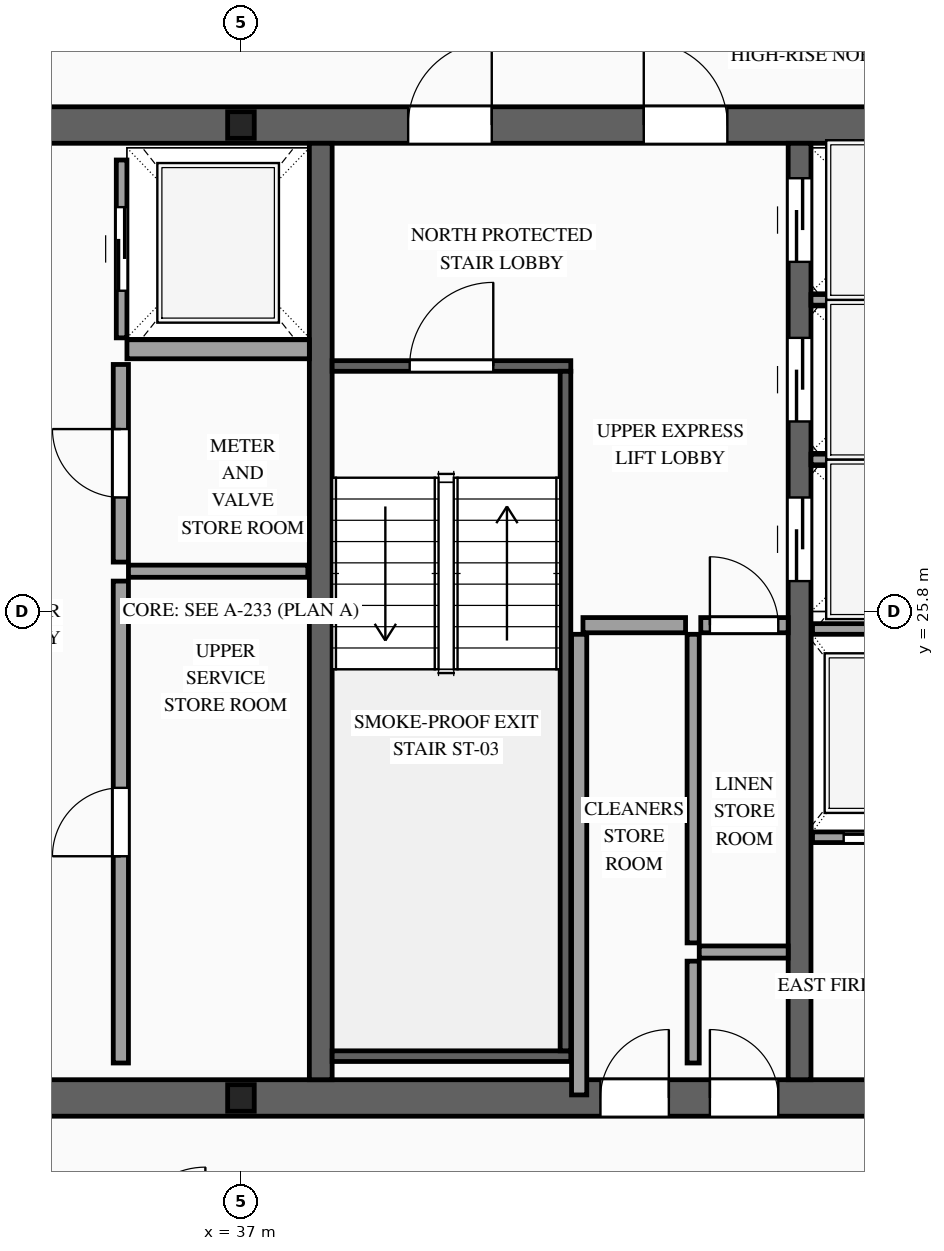
"""IFC4 building model, lengths in metres.
Left out: names, types, materials, properties, quantities, classifications, styles, units other than length and angle.
Written with IfcOpenShell. Run it as: python <this file> out.ifc"""

import sys

from ifc_helpers import new_model, si_unit, direction, frame, frame_2d, origin, origin_2d, place, context, subcontext, project, spatial, rectangle, i_section, extrude, source, transform, mapped, element, fill, save


model = new_model("IFC4")
c1 = context("Model", 3, precision=1e-05, world=origin(), true_north=direction((0.0, 1.0)))
c2 = subcontext(c1, "Body", "Model", "MODEL_VIEW")
j1 = project(units=[si_unit("LENGTHUNIT", "METRE"), si_unit("PLANEANGLEUNIT", "RADIAN")], contexts=[c1])
p1 = place(None, origin())
s1 = spatial("IfcSite", under=j1, at=p1, CompositionType="ELEMENT")
p2 = place(p1, origin())
s2 = spatial("IfcBuilding", under=s1, at=p2, CompositionType="ELEMENT")
p3 = place(p2, frame((0.0, 0.0, 314.7)))
s3 = spatial("IfcBuildingStorey", under=s2, at=p3, CompositionType="ELEMENT", Elevation=314.7)
p4 = place(p3, frame((23.56, 19.4, 0.0), z_axis=(0.0, 0.0, 1.0), x_axis=(1.0, 0.0, 0.0)))
e1 = element("IfcWall", 1, at=p4, inside=s3, PredefinedType="SHEAR", context=c2, shape_type="SweptSolid", body=[
    extrude(rectangle(XDim=26.88, YDim=0.48, at=frame_2d((13.44, 0.0))), origin(), (0.0, 0.0, 1.0), 3.5),
])
p5 = place(p4, frame((1.89, 0.0, 0.0)))
e2 = element("IfcOpeningElement", 2, at=p5, cuts=e1, PredefinedType="OPENING", context=c2, shape_type="SweptSolid", body=[
    extrude(rectangle(XDim=1.1, YDim=2.2, at=frame_2d((0.55, 1.1))), frame((0.0, 0.255, 0.0), z_axis=(0.0, -1.0, 0.0), x_axis=(1.0, 0.0, 0.0)), (0.0, 0.0, 1.0), 0.51),
])
p6 = place(p4, frame((9.79, 0.0, 0.0)))
e3 = element("IfcOpeningElement", 3, at=p6, cuts=e1, PredefinedType="OPENING", context=c2, shape_type="SweptSolid", body=[
    extrude(rectangle(XDim=1.1, YDim=2.2, at=frame_2d((0.55, 1.1))), frame((0.0, 0.255, 0.0), z_axis=(0.0, -1.0, 0.0), x_axis=(1.0, 0.0, 0.0)), (0.0, 0.0, 1.0), 0.51),
])
p7 = place(p4, frame((22.99, 0.0, 0.0)))
e4 = element("IfcOpeningElement", 4, at=p7, cuts=e1, PredefinedType="OPENING", context=c2, shape_type="SweptSolid", body=[
    extrude(rectangle(XDim=1.1, YDim=2.2, at=frame_2d((0.55, 1.1))), frame((0.0, 0.255, 0.0), z_axis=(0.0, -1.0, 0.0), x_axis=(1.0, 0.0, 0.0)), (0.0, 0.0, 1.0), 0.51),
])
p8 = place(p4, frame((19.61, 0.0, 0.0)))
e5 = element("IfcOpeningElement", 5, at=p8, cuts=e1, PredefinedType="OPENING", context=c2, shape_type="SweptSolid", body=[
    extrude(rectangle(XDim=0.9, YDim=2.15, at=frame_2d((0.45, 1.075))), frame((0.0, 0.255, 0.0), z_axis=(0.0, -1.0, 0.0), x_axis=(1.0, 0.0, 0.0)), (0.0, 0.0, 1.0), 0.51),
])
p9 = place(p4, frame((18.17, 0.0, 0.0)))
e6 = element("IfcOpeningElement", 6, at=p9, cuts=e1, PredefinedType="OPENING", context=c2, shape_type="SweptSolid", body=[
    extrude(rectangle(XDim=0.9, YDim=2.15, at=frame_2d((0.45, 1.075))), frame((0.0, 0.255, 0.0), z_axis=(0.0, -1.0, 0.0), x_axis=(1.0, 0.0, 0.0)), (0.0, 0.0, 1.0), 0.51),
])
p10 = place(p3, frame((23.56, 32.2, 0.0), z_axis=(0.0, 0.0, 1.0), x_axis=(1.0, 0.0, 0.0)))
e7 = element("IfcWall", 7, at=p10, inside=s3, PredefinedType="SHEAR", context=c2, shape_type="SweptSolid", body=[
    extrude(rectangle(XDim=26.88, YDim=0.48, at=frame_2d((13.44, 0.0))), origin(), (0.0, 0.0, 1.0), 3.5),
])
p11 = place(p10, frame((4.51, 0.0, 0.0)))
e8 = element("IfcOpeningElement", 8, at=p11, cuts=e7, PredefinedType="OPENING", context=c2, shape_type="SweptSolid", body=[
    extrude(rectangle(XDim=0.9, YDim=2.15, at=frame_2d((0.45, 1.075))), frame((0.0, 0.255, 0.0), z_axis=(0.0, -1.0, 0.0), x_axis=(1.0, 0.0, 0.0)), (0.0, 0.0, 1.0), 0.51),
])
p12 = place(p10, frame((9.79, 0.0, 0.0)))
e9 = element("IfcOpeningElement", 9, at=p12, cuts=e7, PredefinedType="OPENING", context=c2, shape_type="SweptSolid", body=[
    extrude(rectangle(XDim=1.1, YDim=2.2, at=frame_2d((0.55, 1.1))), frame((0.0, 0.255, 0.0), z_axis=(0.0, -1.0, 0.0), x_axis=(1.0, 0.0, 0.0)), (0.0, 0.0, 1.0), 0.51),
])
p13 = place(p10, frame((15.64, 0.0, 0.0)))
e10 = element("IfcOpeningElement", 10, at=p13, cuts=e7, PredefinedType="OPENING", context=c2, shape_type="SweptSolid", body=[
    extrude(rectangle(XDim=1.1, YDim=2.2, at=frame_2d((0.55, 1.1))), frame((0.0, 0.255, 0.0), z_axis=(0.0, -1.0, 0.0), x_axis=(1.0, 0.0, 0.0)), (0.0, 0.0, 1.0), 0.51),
])
p14 = place(p10, frame((18.74, 0.0, 0.0)))
e11 = element("IfcOpeningElement", 11, at=p14, cuts=e7, PredefinedType="OPENING", context=c2, shape_type="SweptSolid", body=[
    extrude(rectangle(XDim=1.1, YDim=2.2, at=frame_2d((0.55, 1.1))), frame((0.0, 0.255, 0.0), z_axis=(0.0, -1.0, 0.0), x_axis=(1.0, 0.0, 0.0)), (0.0, 0.0, 1.0), 0.51),
])
m1 = source(origin(), c2, "Body", "SweptSolid", [
    extrude(rectangle(XDim=12.32, YDim=0.3, at=frame_2d((6.16, 0.0))), origin(), (0.0, 0.0, 1.0), 3.5),
])
p15 = place(p3, frame((38.05, 19.64, 0.0), z_axis=(0.0, 0.0, 1.0), x_axis=(0.0, 1.0, 0.0)))
e12 = element("IfcWall", 12, at=p15, inside=s3, PredefinedType="SOLIDWALL", context=c2, shape_type="MappedRepresentation", body=[
    mapped(m1, transform((0.0, 0.0, 0.0), scale=1.0)),
])
p16 = place(p3, frame((44.35, 19.64, 0.0), z_axis=(0.0, 0.0, 1.0), x_axis=(0.0, 1.0, 0.0)))
e13 = element("IfcWall", 13, at=p16, inside=s3, PredefinedType="SOLIDWALL", context=c2, shape_type="SweptSolid", body=[
    extrude(rectangle(XDim=12.32, YDim=0.3, at=frame_2d((6.16, 0.0))), origin(), (0.0, 0.0, 1.0), 3.5),
])
p17 = place(p16, frame((6.56, 0.0, 0.0)))
e14 = element("IfcOpeningElement", 14, at=p17, cuts=e13, PredefinedType="OPENING", context=c2, shape_type="SweptSolid", body=[
    extrude(rectangle(XDim=1.1, YDim=2.2, at=frame_2d((0.55, 1.1))), frame((0.0, 0.165, 0.0), z_axis=(0.0, -1.0, 0.0), x_axis=(1.0, 0.0, 0.0)), (0.0, 0.0, 1.0), 0.33),
])
p18 = place(p16, frame((8.66, 0.0, 0.0)))
e15 = element("IfcOpeningElement", 15, at=p18, cuts=e13, PredefinedType="OPENING", context=c2, shape_type="SweptSolid", body=[
    extrude(rectangle(XDim=1.1, YDim=2.2, at=frame_2d((0.55, 1.1))), frame((0.0, 0.165, 0.0), z_axis=(0.0, -1.0, 0.0), x_axis=(1.0, 0.0, 0.0)), (0.0, 0.0, 1.0), 0.33),
])
p19 = place(p16, frame((10.76, 0.0, 0.0)))
e16 = element("IfcOpeningElement", 16, at=p19, cuts=e13, PredefinedType="OPENING", context=c2, shape_type="SweptSolid", body=[
    extrude(rectangle(XDim=1.1, YDim=2.2, at=frame_2d((0.55, 1.1))), frame((0.0, 0.165, 0.0), z_axis=(0.0, -1.0, 0.0), x_axis=(1.0, 0.0, 0.0)), (0.0, 0.0, 1.0), 0.33),
])
m2 = source(origin(), c2, "Body", "SweptSolid", [
    extrude(i_section(OverallWidth=0.35, OverallDepth=0.35, WebThickness=0.012, FlangeThickness=0.019, at=origin_2d()), origin(), (0.0, 0.0, 1.0), 3.5),
])
for number, where, z_axis, x_axis in (
    (17, (37.0, 19.4, 0.0), (0.0, 0.0, 1.0), (1.0, 0.0, 0.0)),
    (18, (37.0, 32.2, 0.0), (0.0, 0.0, 1.0), (1.0, 0.0, 0.0)),
):
    element("IfcColumn", number, at=place(p3, frame(where, z_axis=z_axis, x_axis=x_axis)), inside=s3, PredefinedType="COLUMN", context=c2, shape_type="MappedRepresentation", body=[
        mapped(m2, transform((0.0, 0.0, 0.0), scale=1.0)),
    ])
p20 = place(p3, frame((44.52, 22.83, 0.0), z_axis=(0.0, 0.0, 1.0), x_axis=(1.0, 0.0, 0.0)))
e19 = element("IfcWall", 19, at=p20, inside=s3, PredefinedType="SOLIDWALL", context=c2, shape_type="SweptSolid", body=[
    extrude(rectangle(XDim=1.92, YDim=0.14, at=frame_2d((0.96, 0.0))), origin(), (0.0, 0.0, 1.0), 3.28),
])
p21 = place(p20, frame((0.41, 0.0, 0.0)))
e20 = element("IfcOpeningElement", 20, at=p21, cuts=e19, PredefinedType="OPENING", context=c2, shape_type="SweptSolid", body=[
    extrude(rectangle(XDim=1.1, YDim=2.2, at=frame_2d((0.55, 1.1))), frame((0.0, 0.085, 0.0), z_axis=(0.0, -1.0, 0.0), x_axis=(1.0, 0.0, 0.0)), (0.0, 0.0, 1.0), 0.17),
])
m3 = source(origin(), c2, "Body", "SweptSolid", [
    extrude(rectangle(XDim=1.92, YDim=0.14, at=frame_2d((0.96, 0.0))), origin(), (0.0, 0.0, 1.0), 3.28),
])
p22 = place(p3, frame((44.52, 25.57, 0.0), z_axis=(0.0, 0.0, 1.0), x_axis=(1.0, 0.0, 0.0)))
e21 = element("IfcWall", 21, at=p22, inside=s3, PredefinedType="SOLIDWALL", context=c2, shape_type="MappedRepresentation", body=[
    mapped(m3, transform((0.0, 0.0, 0.0), scale=1.0)),
])
p23 = place(p3, frame((35.43, 29.4, 0.0), z_axis=(0.0, 0.0, 1.0), x_axis=(0.0, 1.0, 0.0)))
e22 = element("IfcWall", 22, at=p23, inside=s3, PredefinedType="SOLIDWALL", context=c2, shape_type="SweptSolid", body=[
    extrude(rectangle(XDim=2.34, YDim=0.14, at=frame_2d((1.17, 0.0))), origin(), (0.0, 0.0, 1.0), 3.28),
])
p24 = place(p23, frame((0.62, 0.0, 0.0)))
e23 = element("IfcOpeningElement", 23, at=p24, cuts=e22, PredefinedType="OPENING", context=c2, shape_type="SweptSolid", body=[
    extrude(rectangle(XDim=1.1, YDim=2.2, at=frame_2d((0.55, 1.1))), frame((0.0, 0.085, 0.0), z_axis=(0.0, -1.0, 0.0), x_axis=(1.0, 0.0, 0.0)), (0.0, 0.0, 1.0), 0.17),
])
m4 = source(origin(), c2, "Body", "SweptSolid", [
    extrude(rectangle(XDim=2.4, YDim=0.25, at=frame_2d((1.2, 0.0))), origin(), (0.0, 0.0, 1.0), 3.28),
])
p25 = place(p3, frame((35.5, 29.25, 0.0), z_axis=(0.0, 0.0, 1.0), x_axis=(1.0, 0.0, 0.0)))
e24 = element("IfcWall", 24, at=p25, inside=s3, PredefinedType="SOLIDWALL", context=c2, shape_type="MappedRepresentation", body=[
    mapped(m4, transform((0.0, 0.0, 0.0), scale=1.0)),
])
m5 = source(origin(), c2, "Body", "SweptSolid", [
    extrude(rectangle(XDim=2.0, YDim=0.14, at=frame_2d((1.0, 0.0))), origin(), (0.0, 0.0, 1.0), 3.28),
])
for number, where, z_axis, x_axis in (
    (25, (44.5, 27.8, 0.0), (0.0, 0.0, 1.0), (1.0, 0.0, 0.0)),
    (26, (44.5, 29.9, 0.0), (0.0, 0.0, 1.0), (1.0, 0.0, 0.0)),
):
    element("IfcWall", number, at=place(p3, frame(where, z_axis=z_axis, x_axis=x_axis)), inside=s3, PredefinedType="SOLIDWALL", context=c2, shape_type="MappedRepresentation", body=[
        mapped(m5, transform((0.0, 0.0, 0.0), scale=1.0)),
    ])
p26 = place(p3, frame((38.2, 29.03, 0.0), z_axis=(0.0, 0.0, 1.0), x_axis=(1.0, 0.0, 0.0)))
e27 = element("IfcWall", 27, at=p26, inside=s3, PredefinedType="SOLIDWALL", context=c2, shape_type="SweptSolid", body=[
    extrude(rectangle(XDim=3.14, YDim=0.14, at=frame_2d((1.57, 0.0))), origin(), (0.0, 0.0, 1.0), 3.28),
])
p27 = place(p26, frame((1.02, 0.0, 0.0)))
e28 = element("IfcOpeningElement", 28, at=p27, cuts=e27, PredefinedType="OPENING", context=c2, shape_type="SweptSolid", body=[
    extrude(rectangle(XDim=1.1, YDim=2.2, at=frame_2d((0.55, 1.1))), frame((0.0, 0.085, 0.0), z_axis=(0.0, -1.0, 0.0), x_axis=(1.0, 0.0, 0.0)), (0.0, 0.0, 1.0), 0.17),
])
m6 = source(origin(), c2, "Body", "SweptSolid", [
    extrude(rectangle(XDim=3.14, YDim=0.14, at=frame_2d((1.57, 0.0))), origin(), (0.0, 0.0, 1.0), 3.28),
])
p28 = place(p3, frame((38.2, 19.95, 0.0), z_axis=(0.0, 0.0, 1.0), x_axis=(1.0, 0.0, 0.0)))
e29 = element("IfcWall", 29, at=p28, inside=s3, PredefinedType="SOLIDWALL", context=c2, shape_type="MappedRepresentation", body=[
    mapped(m6, transform((0.0, 0.0, 0.0), scale=1.0)),
])
m7 = source(origin(), c2, "Body", "SweptSolid", [
    extrude(rectangle(XDim=8.94, YDim=0.14, at=frame_2d((4.47, 0.0))), origin(), (0.0, 0.0, 1.0), 3.28),
])
p29 = place(p3, frame((41.27, 20.02, 0.0), z_axis=(0.0, 0.0, 1.0), x_axis=(0.0, 1.0, 0.0)))
e30 = element("IfcWall", 30, at=p29, inside=s3, PredefinedType="SOLIDWALL", context=c2, shape_type="MappedRepresentation", body=[
    mapped(m7, transform((0.0, 0.0, 0.0), scale=1.0)),
])
p30 = place(p3, frame((35.42, 19.86, 0.0), z_axis=(0.0, 0.0, 1.0), x_axis=(0.0, 1.0, 0.0)))
e31 = element("IfcWall", 31, at=p30, inside=s3, PredefinedType="PARTITIONING", context=c2, shape_type="SweptSolid", body=[
    extrude(rectangle(XDim=6.34, YDim=0.2, at=frame_2d((3.17, 0.0))), origin(), (0.0, 0.0, 1.0), 3.28),
])
p31 = place(p30, frame((2.72, 0.0, 0.0)))
e32 = element("IfcOpeningElement", 32, at=p31, cuts=e31, PredefinedType="OPENING", context=c2, shape_type="SweptSolid", body=[
    extrude(rectangle(XDim=0.9, YDim=2.15, at=frame_2d((0.45, 1.075))), frame((0.0, 0.115, 0.0), z_axis=(0.0, -1.0, 0.0), x_axis=(1.0, 0.0, 0.0)), (0.0, 0.0, 1.0), 0.23),
])
p32 = place(p3, frame((35.42, 26.45, 0.0), z_axis=(0.0, 0.0, 1.0), x_axis=(0.0, 1.0, 0.0)))
e33 = element("IfcWall", 33, at=p32, inside=s3, PredefinedType="PARTITIONING", context=c2, shape_type="SweptSolid", body=[
    extrude(rectangle(XDim=2.6, YDim=0.2, at=frame_2d((1.3, 0.0))), origin(), (0.0, 0.0, 1.0), 3.28),
])
p33 = place(p32, frame((0.85, 0.0, 0.0)))
e34 = element("IfcOpeningElement", 34, at=p33, cuts=e33, PredefinedType="OPENING", context=c2, shape_type="SweptSolid", body=[
    extrude(rectangle(XDim=0.9, YDim=2.15, at=frame_2d((0.45, 1.075))), frame((0.0, 0.115, 0.0), z_axis=(0.0, -1.0, 0.0), x_axis=(1.0, 0.0, 0.0)), (0.0, 0.0, 1.0), 0.23),
])
m8 = source(origin(), c2, "Body", "SweptSolid", [
    extrude(rectangle(XDim=2.36, YDim=0.16, at=frame_2d((1.18, 0.0))), origin(), (0.0, 0.0, 1.0), 3.28),
])
p34 = place(p3, frame((35.52, 26.33, 0.0), z_axis=(0.0, 0.0, 1.0), x_axis=(1.0, 0.0, 0.0)))
e35 = element("IfcWall", 35, at=p34, inside=s3, PredefinedType="PARTITIONING", context=c2, shape_type="MappedRepresentation", body=[
    mapped(m8, transform((0.0, 0.0, 0.0), scale=1.0)),
])
m9 = source(origin(), c2, "Body", "SweptSolid", [
    extrude(rectangle(XDim=1.34, YDim=0.16, at=frame_2d((0.67, 0.0))), origin(), (0.0, 0.0, 1.0), 3.28),
])
p35 = place(p3, frame((42.95, 19.86, 0.0), z_axis=(0.0, 0.0, 1.0), x_axis=(0.0, 1.0, 0.0)))
e36 = element("IfcWall", 36, at=p35, inside=s3, PredefinedType="PARTITIONING", context=c2, shape_type="MappedRepresentation", body=[
    mapped(m9, transform((0.0, 0.0, 0.0), scale=1.0)),
])
m10 = source(origin(), c2, "Body", "SweptSolid", [
    extrude(rectangle(XDim=1.17, YDim=0.16, at=frame_2d((0.585, 0.0))), origin(), (0.0, 0.0, 1.0), 3.28),
])
p36 = place(p3, frame((43.03, 21.32, 0.0), z_axis=(0.0, 0.0, 1.0), x_axis=(1.0, 0.0, 0.0)))
e37 = element("IfcWall", 37, at=p36, inside=s3, PredefinedType="PARTITIONING", context=c2, shape_type="MappedRepresentation", body=[
    mapped(m10, transform((0.0, 0.0, 0.0), scale=1.0)),
])
m11 = source(origin(), c2, "Body", "SweptSolid", [
    extrude(rectangle(XDim=6.06, YDim=0.2, at=frame_2d((3.03, 0.0))), origin(), (0.0, 0.0, 1.0), 3.28),
])
p37 = place(p3, frame((41.45, 19.44, 0.0), z_axis=(0.0, 0.0, 1.0), x_axis=(0.0, 1.0, 0.0)))
e38 = element("IfcWall", 38, at=p37, inside=s3, PredefinedType="PARTITIONING", context=c2, shape_type="MappedRepresentation", body=[
    mapped(m11, transform((0.0, 0.0, 0.0), scale=1.0)),
])
m12 = source(origin(), c2, "Body", "SweptSolid", [
    extrude(rectangle(XDim=1.35, YDim=0.2, at=frame_2d((0.675, 0.0))), origin(), (0.0, 0.0, 1.0), 3.28),
])
p38 = place(p3, frame((41.5, 25.62, 0.0), z_axis=(0.0, 0.0, 1.0), x_axis=(1.0, 0.0, 0.0)))
e39 = element("IfcWall", 39, at=p38, inside=s3, PredefinedType="PARTITIONING", context=c2, shape_type="MappedRepresentation", body=[
    mapped(m12, transform((0.0, 0.0, 0.0), scale=1.0)),
])
m13 = source(origin(), c2, "Body", "SweptSolid", [
    extrude(rectangle(XDim=4.06, YDim=0.16, at=frame_2d((2.03, 0.0))), origin(), (0.0, 0.0, 1.0), 3.28),
])
p39 = place(p3, frame((42.95, 21.44, 0.0), z_axis=(0.0, 0.0, 1.0), x_axis=(0.0, 1.0, 0.0)))
e40 = element("IfcWall", 40, at=p39, inside=s3, PredefinedType="PARTITIONING", context=c2, shape_type="MappedRepresentation", body=[
    mapped(m13, transform((0.0, 0.0, 0.0), scale=1.0)),
])
p40 = place(p3, frame((43.05, 25.62, 0.0), z_axis=(0.0, 0.0, 1.0), x_axis=(1.0, 0.0, 0.0)))
e41 = element("IfcWall", 41, at=p40, inside=s3, PredefinedType="PARTITIONING", context=c2, shape_type="SweptSolid", body=[
    extrude(rectangle(XDim=1.15, YDim=0.2, at=frame_2d((0.575, 0.0))), origin(), (0.0, 0.0, 1.0), 3.28),
])
p41 = place(p40, frame((0.12, 0.0, 0.0)))
e42 = element("IfcOpeningElement", 42, at=p41, cuts=e41, PredefinedType="OPENING", context=c2, shape_type="SweptSolid", body=[
    extrude(rectangle(XDim=0.9, YDim=2.15, at=frame_2d((0.45, 1.075))), frame((0.0, 0.115, 0.0), z_axis=(0.0, -1.0, 0.0), x_axis=(1.0, 0.0, 0.0)), (0.0, 0.0, 1.0), 0.23),
])
m14 = source(origin(), c2, "Body", "SweptSolid", [
    extrude(rectangle(XDim=1.1, YDim=2.2, at=frame_2d((0.55, 1.1))), frame((0.0, 0.025, 0.0), z_axis=(0.0, -1.0, 0.0), x_axis=(1.0, 0.0, 0.0)), (0.0, 0.0, 1.0), 0.05),
])
p42 = place(p21, origin())
e43 = element("IfcDoor", 43, at=p42, inside=s3, OperationType="SLIDING_TO_RIGHT", PredefinedType="DOOR", context=c2, shape_type="MappedRepresentation", body=[
    mapped(m14, transform((0.0, 0.0, 0.0), scale=1.0)),
])
fill(e20, e43)
p43 = place(p24, origin())
e44 = element("IfcDoor", 44, at=p43, inside=s3, OperationType="SLIDING_TO_RIGHT", PredefinedType="DOOR", context=c2, shape_type="MappedRepresentation", body=[
    mapped(m14, transform((0.0, 0.0, 0.0), scale=1.0)),
])
fill(e23, e44)
p44 = place(p17, origin())
e45 = element("IfcDoor", 45, at=p44, inside=s3, OperationType="SLIDING_TO_LEFT", PredefinedType="DOOR", context=c2, shape_type="MappedRepresentation", body=[
    mapped(m14, transform((0.0, 0.0, 0.0), scale=1.0)),
])
fill(e14, e45)
p45 = place(p18, origin())
e46 = element("IfcDoor", 46, at=p45, inside=s3, OperationType="SLIDING_TO_RIGHT", PredefinedType="DOOR", context=c2, shape_type="MappedRepresentation", body=[
    mapped(m14, transform((0.0, 0.0, 0.0), scale=1.0)),
])
fill(e15, e46)
p46 = place(p19, origin())
e47 = element("IfcDoor", 47, at=p46, inside=s3, OperationType="SLIDING_TO_LEFT", PredefinedType="DOOR", context=c2, shape_type="MappedRepresentation", body=[
    mapped(m14, transform((0.0, 0.0, 0.0), scale=1.0)),
])
fill(e16, e47)
m15 = source(origin(), c2, "Body", "SweptSolid", [
    extrude(rectangle(XDim=1.1, YDim=2.2, at=frame_2d((0.55, 1.1))), frame((0.0, 0.025, 0.0), z_axis=(0.0, -1.0, 0.0), x_axis=(1.0, 0.0, 0.0)), (0.0, 0.0, 1.0), 0.05),
])
p47 = place(p27, origin())
e48 = element("IfcDoor", 48, at=p47, inside=s3, OperationType="SINGLE_SWING_RIGHT", PredefinedType="DOOR", context=c2, shape_type="MappedRepresentation", body=[
    mapped(m15, transform((0.0, 0.0, 0.0), scale=1.0)),
])
fill(e28, e48)
p48 = place(p13, origin())
e49 = element("IfcDoor", 49, at=p48, inside=s3, OperationType="SINGLE_SWING_RIGHT", PredefinedType="DOOR", context=c2, shape_type="MappedRepresentation", body=[
    mapped(m15, transform((0.0, 0.0, 0.0), scale=1.0)),
])
fill(e10, e49)
p49 = place(p14, origin())
e50 = element("IfcDoor", 50, at=p49, inside=s3, OperationType="SINGLE_SWING_LEFT", PredefinedType="DOOR", context=c2, shape_type="MappedRepresentation", body=[
    mapped(m15, transform((0.0, 0.0, 0.0), scale=1.0)),
])
fill(e11, e50)
m16 = source(origin(), c2, "Body", "SweptSolid", [
    extrude(rectangle(XDim=0.9, YDim=2.15, at=frame_2d((0.45, 1.075))), frame((0.0, 0.025, 0.0), z_axis=(0.0, -1.0, 0.0), x_axis=(1.0, 0.0, 0.0)), (0.0, 0.0, 1.0), 0.05),
])
p50 = place(p31, origin())
e51 = element("IfcDoor", 51, at=p50, inside=s3, OperationType="SINGLE_SWING_LEFT", PredefinedType="DOOR", context=c2, shape_type="MappedRepresentation", body=[
    mapped(m16, transform((0.0, 0.0, 0.0), scale=1.0)),
])
fill(e32, e51)
p51 = place(p33, origin())
e52 = element("IfcDoor", 52, at=p51, inside=s3, OperationType="SINGLE_SWING_RIGHT", PredefinedType="DOOR", context=c2, shape_type="MappedRepresentation", body=[
    mapped(m16, transform((0.0, 0.0, 0.0), scale=1.0)),
])
fill(e34, e52)
p52 = place(p8, origin())
e53 = element("IfcDoor", 53, at=p52, inside=s3, OperationType="SINGLE_SWING_LEFT", PredefinedType="DOOR", context=c2, shape_type="MappedRepresentation", body=[
    mapped(m16, transform((0.0, 0.0, 0.0), scale=1.0)),
])
fill(e5, e53)
p53 = place(p9, origin())
e54 = element("IfcDoor", 54, at=p53, inside=s3, OperationType="SINGLE_SWING_RIGHT", PredefinedType="DOOR", context=c2, shape_type="MappedRepresentation", body=[
    mapped(m16, transform((0.0, 0.0, 0.0), scale=1.0)),
])
fill(e6, e54)
p54 = place(p41, origin())
e55 = element("IfcDoor", 55, at=p54, inside=s3, OperationType="SINGLE_SWING_LEFT", PredefinedType="DOOR", context=c2, shape_type="MappedRepresentation", body=[
    mapped(m16, transform((0.0, 0.0, 0.0), scale=1.0)),
])
fill(e42, e55)
save(model, sys.argv[1])
